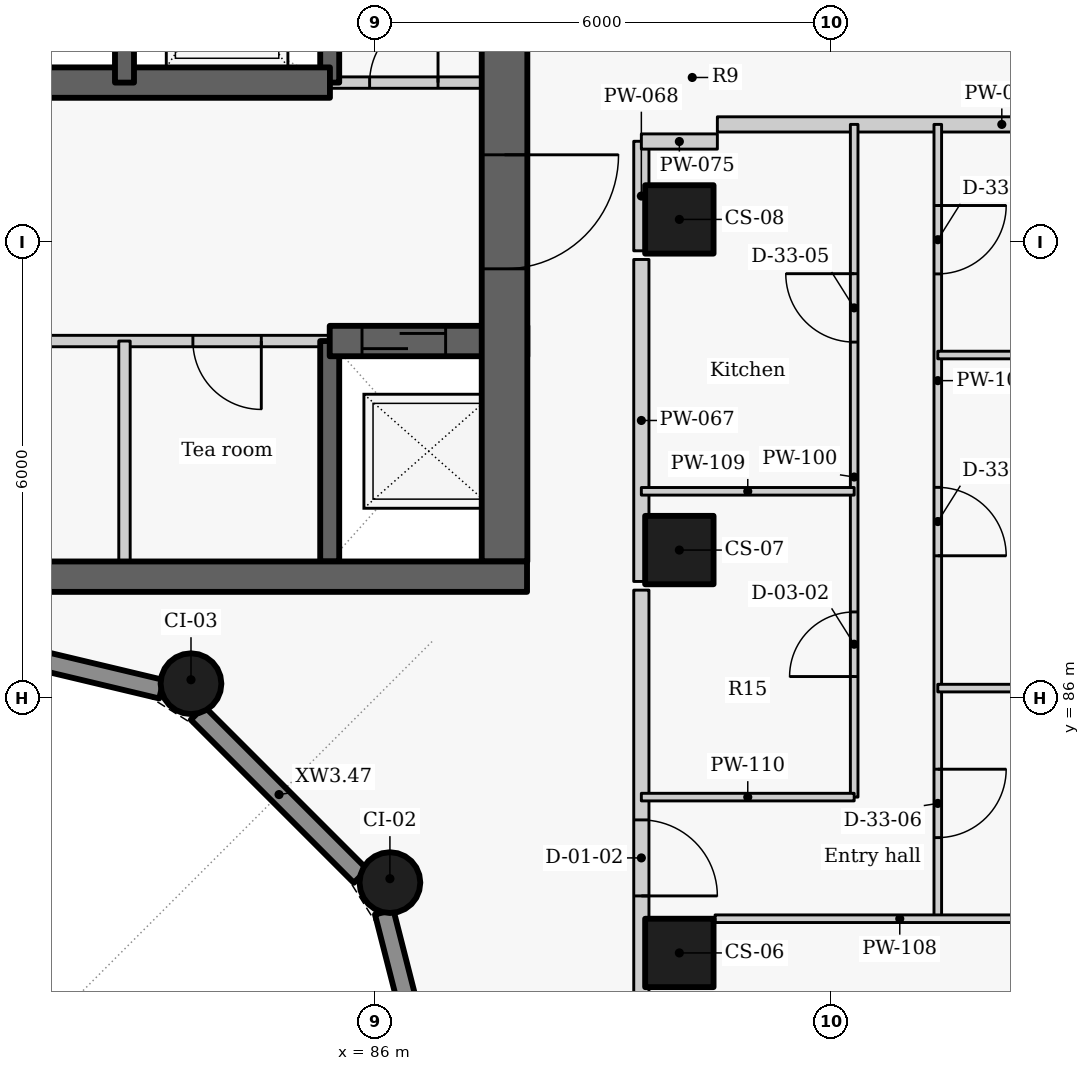
"""IFC4 building model, lengths in metres.
Left out: names, types, materials, properties, quantities, classifications, styles, units other than length and angle.
Written with IfcOpenShell. Run it as: python <this file> out.ifc"""

import sys

from ifc_helpers import new_model, si_unit, direction, frame, frame_2d, origin, origin_2d, place, context, subcontext, project, spatial, rectangle, circle, extrude, element, fill, save


model = new_model("IFC4")
c1 = context("Model", 3, precision=1e-05, world=origin(), true_north=direction((0.0, 1.0)))
c2 = subcontext(c1, "Body", "Model", "MODEL_VIEW")
j1 = project(units=[si_unit("LENGTHUNIT", "METRE"), si_unit("PLANEANGLEUNIT", "RADIAN")], contexts=[c1])
p1 = place(None, origin())
s1 = spatial("IfcSite", under=j1, at=p1, CompositionType="ELEMENT")
p2 = place(p1, origin())
s2 = spatial("IfcBuilding", under=s1, at=p2, CompositionType="ELEMENT")
p3 = place(p2, frame((0.0, 0.0, 226.2)))
s3 = spatial("IfcBuildingStorey", under=s2, at=p3, CompositionType="ELEMENT", Elevation=226.2)
for number, where, z_axis, x_axis in (
    (1, (90.0, 82.65, 0.0), (0.0, 0.0, 1.0), (0.0, 1.0, 0.0)),
    (2, (90.0, 87.95, 0.0), (0.0, 0.0, 1.0), (0.0, 1.0, 0.0)),
    (3, (90.0, 92.3, 0.0), (0.0, 0.0, 1.0), (0.0, 1.0, 0.0)),
):
    element("IfcColumn", number, at=place(p3, frame(where, z_axis=z_axis, x_axis=x_axis)), inside=s3, PredefinedType="COLUMN", context=c2, shape_type="SweptSolid", body=[
        extrude(rectangle(XDim=0.9, YDim=0.9, at=origin_2d()), origin(), (0.0, 0.0, 1.0), 3.3),
    ])
for number, where, z_axis, x_axis in (
    (4, (86.192, 83.575, 0.0), (0.0, 0.0, 1.0), (-0.5, 0.866, 0.0)),
    (5, (83.575, 86.192, 0.0), (0.0, 0.0, 1.0), (-0.866, 0.5, 0.0)),
):
    element("IfcColumn", number, at=place(p3, frame(where, z_axis=z_axis, x_axis=x_axis)), inside=s3, PredefinedType="COLUMN", context=c2, shape_type="SweptSolid", body=[
        extrude(circle(Radius=0.4, at=origin_2d()), origin(), (0.0, 0.0, 1.0), 3.3),
    ])
p4 = place(p3, frame((80.029, 86.872, 0.0), z_axis=(0.0, 0.0, 1.0), x_axis=(0.972773113459, -0.231759508395, 0.0)))
e6 = element("IfcWall", 6, at=p4, inside=s3, PredefinedType="SOLIDWALL", context=c2, shape_type="SweptSolid", body=[
    extrude(rectangle(XDim=3.246, YDim=0.25, at=frame_2d((1.623, 0.0))), origin(), (0.0, 0.0, 1.0), 2.425),
])
p5 = place(p3, frame((83.661, 85.806, 0.0), z_axis=(0.0, 0.0, 1.0), x_axis=(0.707106781187, -0.707106781187, 0.0)))
e7 = element("IfcWall", 7, at=p5, inside=s3, PredefinedType="SOLIDWALL", context=c2, shape_type="SweptSolid", body=[
    extrude(rectangle(XDim=3.033, YDim=0.25, at=frame_2d((1.517, 0.0))), origin(), (0.0, 0.0, 1.0), 2.425),
])
p6 = place(p3, frame((86.117, 83.187, 0.0), z_axis=(0.0, 0.0, 1.0), x_axis=(0.247055971283, -0.969001211069, 0.0)))
e8 = element("IfcWall", 8, at=p6, inside=s3, PredefinedType="SOLIDWALL", context=c2, shape_type="SweptSolid", body=[
    extrude(rectangle(XDim=3.01, YDim=0.25, at=frame_2d((1.505, 0.0))), origin(), (0.0, 0.0, 1.0), 2.425),
])
p7 = place(p3, frame((85.4, 90.7, 0.0), z_axis=(0.0, 0.0, 1.0), x_axis=(-1.0, 0.0, 0.0)))
e9 = element("IfcWall", 9, at=p7, inside=s3, PredefinedType="PARTITIONING", context=c2, shape_type="SweptSolid", body=[
    extrude(rectangle(XDim=13.4, YDim=0.15, at=frame_2d((6.7, 0.0))), origin(), (0.0, 0.0, 1.0), 3.025),
])
p8 = place(p7, frame((11.325, 0.0, 0.0)))
e10 = element("IfcOpeningElement", 10, at=p8, cuts=e9, PredefinedType="OPENING", context=c2, shape_type="SweptSolid", body=[
    extrude(rectangle(XDim=0.9, YDim=2.1, at=frame_2d((0.45, 1.05))), frame((0.0, 0.085, 0.0), z_axis=(0.0, -1.0, 0.0), x_axis=(1.0, 0.0, 0.0)), (0.0, 0.0, 1.0), 0.17),
])
p9 = place(p7, frame((9.0, 0.0, 0.0)))
e11 = element("IfcOpeningElement", 11, at=p9, cuts=e9, PredefinedType="OPENING", context=c2, shape_type="SweptSolid", body=[
    extrude(rectangle(XDim=0.9, YDim=2.1, at=frame_2d((0.45, 1.05))), frame((0.0, 0.085, 0.0), z_axis=(0.0, -1.0, 0.0), x_axis=(1.0, 0.0, 0.0)), (0.0, 0.0, 1.0), 0.17),
])
p10 = place(p7, frame((4.95, 0.0, 0.0)))
e12 = element("IfcOpeningElement", 12, at=p10, cuts=e9, PredefinedType="OPENING", context=c2, shape_type="SweptSolid", body=[
    extrude(rectangle(XDim=0.9, YDim=2.1, at=frame_2d((0.45, 1.05))), frame((0.0, 0.085, 0.0), z_axis=(0.0, -1.0, 0.0), x_axis=(1.0, 0.0, 0.0)), (0.0, 0.0, 1.0), 0.17),
])
p11 = place(p7, frame((0.9, 0.0, 0.0)))
e13 = element("IfcOpeningElement", 13, at=p11, cuts=e9, PredefinedType="OPENING", context=c2, shape_type="SweptSolid", body=[
    extrude(rectangle(XDim=0.9, YDim=2.1, at=frame_2d((0.45, 1.05))), frame((0.0, 0.085, 0.0), z_axis=(0.0, -1.0, 0.0), x_axis=(1.0, 0.0, 0.0)), (0.0, 0.0, 1.0), 0.17),
])
p12 = place(p3, frame((85.4, 87.8, -0.41), z_axis=(0.0, 0.0, 1.0), x_axis=(0.0, 1.0, 0.0)))
e14 = element("IfcWall", 14, at=p12, inside=s3, PredefinedType="SHEAR", context=c2, shape_type="SweptSolid", body=[
    extrude(rectangle(XDim=2.9, YDim=0.25, at=frame_2d((1.45, 0.0))), origin(), (0.0, 0.0, 1.0), 3.435),
])
p13 = place(p3, frame((85.4, 94.1, -0.41), z_axis=(0.0, 0.0, 1.0), x_axis=(0.0, 1.0, 0.0)))
e15 = element("IfcWall", 15, at=p13, inside=s3, PredefinedType="SHEAR", context=c2, shape_type="SweptSolid", body=[
    extrude(rectangle(XDim=2.8, YDim=0.25, at=frame_2d((1.4, 0.0))), origin(), (0.0, 0.0, 1.0), 3.435),
])
p14 = place(p3, frame((85.4, 90.7, -0.41), z_axis=(0.0, 0.0, 1.0), x_axis=(1.0, 0.0, 0.0)))
e16 = element("IfcWall", 16, at=p14, inside=s3, PredefinedType="SHEAR", context=c2, shape_type="SweptSolid", body=[
    extrude(rectangle(XDim=2.6, YDim=0.4, at=frame_2d((1.3, 0.0))), origin(), (0.0, 0.0, 1.0), 3.435),
])
p15 = place(p14, frame((0.425, 0.0, 0.41)))
e17 = element("IfcOpeningElement", 17, at=p15, cuts=e16, PredefinedType="OPENING", context=c2, shape_type="SweptSolid", body=[
    extrude(rectangle(XDim=1.1, YDim=2.1, at=frame_2d((0.55, 1.05))), frame((0.0, 0.21, 0.0), z_axis=(0.0, -1.0, 0.0), x_axis=(1.0, 0.0, 0.0)), (0.0, 0.0, 1.0), 0.42),
])
p16 = place(p3, frame((87.7, 102.05, -0.41), z_axis=(0.0, 0.0, 1.0), x_axis=(0.0, -1.0, 0.0)))
e18 = element("IfcWall", 18, at=p16, inside=s3, PredefinedType="SHEAR", context=c2, shape_type="SweptSolid", body=[
    extrude(rectangle(XDim=14.25, YDim=0.6, at=frame_2d((7.125, 0.0))), origin(), (0.0, 0.0, 1.0), 3.435),
])
p17 = place(p16, frame((8.9, 0.0, 0.41)))
e19 = element("IfcOpeningElement", 19, at=p17, cuts=e18, PredefinedType="OPENING", context=c2, shape_type="SweptSolid", body=[
    extrude(rectangle(XDim=1.5, YDim=2.1, at=frame_2d((0.75, 1.05))), frame((0.0, 0.31, 0.0), z_axis=(0.0, -1.0, 0.0), x_axis=(1.0, 0.0, 0.0)), (0.0, 0.0, 1.0), 0.62),
])
p18 = place(p16, frame((2.025, 0.0, 0.41)))
e20 = element("IfcOpeningElement", 20, at=p18, cuts=e18, PredefinedType="OPENING", context=c2, shape_type="SweptSolid", body=[
    extrude(rectangle(XDim=1.1, YDim=2.1, at=frame_2d((0.55, 1.05))), frame((0.0, 0.31, 0.0), z_axis=(0.0, -1.0, 0.0), x_axis=(1.0, 0.0, 0.0)), (0.0, 0.0, 1.0), 0.62),
])
p19 = place(p3, frame((82.7, 87.8, 0.0), z_axis=(0.0, 0.0, 1.0), x_axis=(0.0, 1.0, 0.0)))
e21 = element("IfcWall", 21, at=p19, inside=s3, PredefinedType="PARTITIONING", context=c2, shape_type="SweptSolid", body=[
    extrude(rectangle(XDim=2.9, YDim=0.15, at=frame_2d((1.45, 0.0))), origin(), (0.0, 0.0, 1.0), 3.025),
])
p20 = place(p3, frame((85.397, 94.1, 0.0), z_axis=(0.0, 0.0, 1.0), x_axis=(1.0, 0.0, 0.0)))
e22 = element("IfcWall", 22, at=p20, inside=s3, PredefinedType="PARTITIONING", context=c2, shape_type="SweptSolid", body=[
    extrude(rectangle(XDim=2.603, YDim=0.15, at=frame_2d((1.302, 0.0))), origin(), (0.0, 0.0, 1.0), 3.025),
])
p21 = place(p20, frame((0.528, 0.0, 0.0)))
e23 = element("IfcOpeningElement", 23, at=p21, cuts=e22, PredefinedType="OPENING", context=c2, shape_type="SweptSolid", body=[
    extrude(rectangle(XDim=0.9, YDim=2.1, at=frame_2d((0.45, 1.05))), frame((0.0, 0.085, 0.0), z_axis=(0.0, -1.0, 0.0), x_axis=(1.0, 0.0, 0.0)), (0.0, 0.0, 1.0), 0.17),
])
p22 = place(p3, frame((79.997, 94.1, -0.41), z_axis=(0.0, 0.0, 1.0), x_axis=(1.0, 0.0, 0.0)))
e24 = element("IfcWall", 24, at=p22, inside=s3, PredefinedType="SHEAR", context=c2, shape_type="SweptSolid", body=[
    extrude(rectangle(XDim=5.406, YDim=0.4, at=frame_2d((2.703, 0.0))), origin(), (0.0, 0.0, 1.0), 3.435),
])
p23 = place(p3, frame((82.7, 94.1, -0.41), z_axis=(0.0, 0.0, 1.0), x_axis=(0.0, 1.0, 0.0)))
e25 = element("IfcWall", 25, at=p23, inside=s3, PredefinedType="SHEAR", context=c2, shape_type="SweptSolid", body=[
    extrude(rectangle(XDim=2.8, YDim=0.25, at=frame_2d((1.4, 0.0))), origin(), (0.0, 0.0, 1.0), 3.435),
])
p24 = place(p3, frame((89.5, 87.423, 0.0), z_axis=(0.0, 0.0, 1.0), x_axis=(0.0, -1.0, 0.0)))
e26 = element("IfcWall", 26, at=p24, inside=s3, PredefinedType="PARTITIONING", context=c2, shape_type="SweptSolid", body=[
    extrude(rectangle(XDim=15.786, YDim=0.2, at=frame_2d((7.893, 0.0))), origin(), (0.0, 0.0, 1.0), 3.025),
])
p25 = place(p24, frame((6.923, 0.0, 0.0)))
e27 = element("IfcOpeningElement", 27, at=p25, cuts=e26, PredefinedType="OPENING", context=c2, shape_type="SweptSolid", body=[
    extrude(rectangle(XDim=1.0, YDim=2.1, at=frame_2d((0.5, 1.05))), frame((0.0, 0.11, 0.0), z_axis=(0.0, -1.0, 0.0), x_axis=(1.0, 0.0, 0.0)), (0.0, 0.0, 1.0), 0.22),
])
p26 = place(p24, frame((3.023, 0.0, 0.0)))
e28 = element("IfcOpeningElement", 28, at=p26, cuts=e26, PredefinedType="OPENING", context=c2, shape_type="SweptSolid", body=[
    extrude(rectangle(XDim=1.0, YDim=2.1, at=frame_2d((0.5, 1.05))), frame((0.0, 0.11, 0.0), z_axis=(0.0, -1.0, 0.0), x_axis=(1.0, 0.0, 0.0)), (0.0, 0.0, 1.0), 0.22),
])
p27 = place(p3, frame((89.5, 87.537, 0.0), z_axis=(0.0, 0.0, 1.0), x_axis=(0.0, 1.0, 0.0)))
e29 = element("IfcWall", 29, at=p27, inside=s3, PredefinedType="PARTITIONING", context=c2, shape_type="SweptSolid", body=[
    extrude(rectangle(XDim=4.236, YDim=0.2, at=frame_2d((2.118, 0.0))), origin(), (0.0, 0.0, 1.0), 3.025),
])
p28 = place(p3, frame((89.5, 91.887, 0.0), z_axis=(0.0, 0.0, 1.0), x_axis=(0.0, 1.0, 0.0)))
e30 = element("IfcWall", 30, at=p28, inside=s3, PredefinedType="PARTITIONING", context=c2, shape_type="SweptSolid", body=[
    extrude(rectangle(XDim=1.441, YDim=0.2, at=frame_2d((0.72, 0.0))), origin(), (0.0, 0.0, 1.0), 3.025),
])
p29 = place(p3, frame((90.5, 93.55, 0.0), z_axis=(0.0, 0.0, 1.0), x_axis=(1.0, 0.0, 0.0)))
e31 = element("IfcWall", 31, at=p29, inside=s3, PredefinedType="PARTITIONING", context=c2, shape_type="SweptSolid", body=[
    extrude(rectangle(XDim=7.485, YDim=0.2, at=frame_2d((3.742, 0.0))), origin(), (0.0, 0.0, 1.0), 2.405),
])
p30 = place(p3, frame((89.5, 93.325, 0.0), z_axis=(0.0, 0.0, 1.0), x_axis=(1.0, 0.0, 0.0)))
e32 = element("IfcWall", 32, at=p30, inside=s3, PredefinedType="PARTITIONING", context=c2, shape_type="SweptSolid", body=[
    extrude(rectangle(XDim=1.0, YDim=0.2, at=frame_2d((0.5, 0.0))), origin(), (0.0, 0.0, 1.0), 2.505),
])
p31 = place(p3, frame((92.3, 84.7, 0.0), z_axis=(0.0, 0.0, 1.0), x_axis=(0.0, 1.0, 0.0)))
e33 = element("IfcWall", 33, at=p31, inside=s3, PredefinedType="PARTITIONING", context=c2, shape_type="SweptSolid", body=[
    extrude(rectangle(XDim=8.85, YDim=0.1, at=frame_2d((4.425, 0.0))), origin(), (0.0, 0.0, 1.0), 3.025),
])
p32 = place(p31, frame((1.586, 0.0, 0.0)))
e34 = element("IfcOpeningElement", 34, at=p32, cuts=e33, PredefinedType="OPENING", context=c2, shape_type="SweptSolid", body=[
    extrude(rectangle(XDim=0.85, YDim=2.1, at=frame_2d((0.425, 1.05))), frame((0.0, 0.06, 0.0), z_axis=(0.0, -1.0, 0.0), x_axis=(1.0, 0.0, 0.0)), (0.0, 0.0, 1.0), 0.12),
])
p33 = place(p31, frame((5.986, 0.0, 0.0)))
e35 = element("IfcOpeningElement", 35, at=p33, cuts=e33, PredefinedType="OPENING", context=c2, shape_type="SweptSolid", body=[
    extrude(rectangle(XDim=0.9, YDim=2.1, at=frame_2d((0.45, 1.05))), frame((0.0, 0.06, 0.0), z_axis=(0.0, -1.0, 0.0), x_axis=(1.0, 0.0, 0.0)), (0.0, 0.0, 1.0), 0.12),
])
p34 = place(p3, frame((93.4, 93.55, 0.0), z_axis=(0.0, 0.0, 1.0), x_axis=(0.0, -1.0, 0.0)))
e36 = element("IfcWall", 36, at=p34, inside=s3, PredefinedType="PARTITIONING", context=c2, shape_type="SweptSolid", body=[
    extrude(rectangle(XDim=10.45, YDim=0.1, at=frame_2d((5.225, 0.0))), origin(), (0.0, 0.0, 1.0), 3.025),
])
p35 = place(p34, frame((8.483, 0.0, 0.0)))
e37 = element("IfcOpeningElement", 37, at=p35, cuts=e36, PredefinedType="OPENING", context=c2, shape_type="SweptSolid", body=[
    extrude(rectangle(XDim=0.9, YDim=2.1, at=frame_2d((0.45, 1.05))), frame((0.0, 0.06, 0.0), z_axis=(0.0, -1.0, 0.0), x_axis=(1.0, 0.0, 0.0)), (0.0, 0.0, 1.0), 0.12),
])
p36 = place(p34, frame((4.775, 0.0, 0.0)))
e38 = element("IfcOpeningElement", 38, at=p36, cuts=e36, PredefinedType="OPENING", context=c2, shape_type="SweptSolid", body=[
    extrude(rectangle(XDim=0.9, YDim=2.1, at=frame_2d((0.45, 1.05))), frame((0.0, 0.06, 0.0), z_axis=(0.0, -1.0, 0.0), x_axis=(1.0, 0.0, 0.0)), (0.0, 0.0, 1.0), 0.12),
])
p37 = place(p34, frame((1.067, 0.0, 0.0)))
e39 = element("IfcOpeningElement", 39, at=p37, cuts=e36, PredefinedType="OPENING", context=c2, shape_type="SweptSolid", body=[
    extrude(rectangle(XDim=0.9, YDim=2.1, at=frame_2d((0.45, 1.05))), frame((0.0, 0.06, 0.0), z_axis=(0.0, -1.0, 0.0), x_axis=(1.0, 0.0, 0.0)), (0.0, 0.0, 1.0), 0.12),
])
p38 = place(p3, frame((90.47, 83.1, 0.0), z_axis=(0.0, 0.0, 1.0), x_axis=(1.0, 0.0, 0.0)))
e40 = element("IfcWall", 40, at=p38, inside=s3, PredefinedType="PARTITIONING", context=c2, shape_type="SweptSolid", body=[
    extrude(rectangle(XDim=4.86, YDim=0.1, at=frame_2d((2.43, 0.0))), origin(), (0.0, 0.0, 1.0), 3.025),
])
for number, where, z_axis, x_axis in (
    (41, (89.5, 88.723, 0.0), (0.0, 0.0, 1.0), (1.0, 0.0, 0.0)),
    (42, (89.5, 84.7, 0.0), (0.0, 0.0, 1.0), (1.0, 0.0, 0.0)),
):
    element("IfcWall", number, at=place(p3, frame(where, z_axis=z_axis, x_axis=x_axis)), inside=s3, PredefinedType="PARTITIONING", context=c2, shape_type="SweptSolid", body=[
        extrude(rectangle(XDim=2.8, YDim=0.1, at=frame_2d((1.4, 0.0))), origin(), (0.0, 0.0, 1.0), 2.505),
    ])
p39 = place(p3, frame((93.4, 86.134, 0.0), z_axis=(0.0, 0.0, 1.0), x_axis=(1.0, 0.0, 0.0)))
e43 = element("IfcWall", 43, at=p39, inside=s3, PredefinedType="PARTITIONING", context=c2, shape_type="SweptSolid", body=[
    extrude(rectangle(XDim=8.866, YDim=0.1, at=frame_2d((4.433, 0.0))), origin(), (0.0, 0.0, 1.0), 2.405),
])
p40 = place(p3, frame((93.4, 90.516, 0.0), z_axis=(0.0, 0.0, 1.0), x_axis=(1.0, 0.0, 0.0)))
e44 = element("IfcWall", 44, at=p40, inside=s3, PredefinedType="PARTITIONING", context=c2, shape_type="SweptSolid", body=[
    extrude(rectangle(XDim=6.336, YDim=0.1, at=frame_2d((3.168, 0.0))), origin(), (0.0, 0.0, 1.0), 2.405),
])
p41 = place(p3, frame((72.004, 87.6, -0.41), z_axis=(0.0, 0.0, 1.0), x_axis=(1.0, 0.0, 0.0)))
e45 = element("IfcWall", 45, at=p41, inside=s3, PredefinedType="SHEAR", context=c2, shape_type="SweptSolid", body=[
    extrude(rectangle(XDim=15.992, YDim=0.4, at=frame_2d((7.996, 0.0))), origin(), (0.0, 0.0, 1.0), 3.435),
])
p42 = place(p15, origin())
e46 = element("IfcDoor", 46, at=p42, inside=s3, OperationType="SLIDING_TO_LEFT", PredefinedType="DOOR", context=c2, shape_type="SweptSolid", body=[
    extrude(rectangle(XDim=1.1, YDim=2.1, at=frame_2d((0.55, 1.05))), frame((0.0, 0.025, 0.0), z_axis=(0.0, -1.0, 0.0), x_axis=(1.0, 0.0, 0.0)), (0.0, 0.0, 1.0), 0.05),
])
fill(e17, e46)
p43 = place(p11, origin())
e47 = element("IfcDoor", 47, at=p43, inside=s3, OperationType="SINGLE_SWING_LEFT", PredefinedType="DOOR", context=c2, shape_type="SweptSolid", body=[
    extrude(rectangle(XDim=0.9, YDim=2.1, at=frame_2d((0.45, 1.05))), frame((0.0, 0.025, 0.0), z_axis=(0.0, -1.0, 0.0), x_axis=(1.0, 0.0, 0.0)), (0.0, 0.0, 1.0), 0.05),
])
fill(e13, e47)
p44 = place(p21, origin())
e48 = element("IfcDoor", 48, at=p44, inside=s3, OperationType="SINGLE_SWING_RIGHT", PredefinedType="DOOR", context=c2, shape_type="SweptSolid", body=[
    extrude(rectangle(XDim=0.9, YDim=2.1, at=frame_2d((0.45, 1.05))), frame((0.0, 0.025, 0.0), z_axis=(0.0, -1.0, 0.0), x_axis=(1.0, 0.0, 0.0)), (0.0, 0.0, 1.0), 0.05),
])
fill(e23, e48)
p45 = place(p26, origin())
e49 = element("IfcDoor", 49, at=p45, inside=s3, OperationType="SINGLE_SWING_RIGHT", PredefinedType="DOOR", context=c2, shape_type="SweptSolid", body=[
    extrude(rectangle(XDim=1.0, YDim=2.1, at=frame_2d((0.5, 1.05))), frame((0.0, 0.025, 0.0), z_axis=(0.0, -1.0, 0.0), x_axis=(1.0, 0.0, 0.0)), (0.0, 0.0, 1.0), 0.05),
])
fill(e28, e49)
p46 = place(p32, origin())
e50 = element("IfcDoor", 50, at=p46, inside=s3, OperationType="SINGLE_SWING_LEFT", PredefinedType="DOOR", context=c2, shape_type="SweptSolid", body=[
    extrude(rectangle(XDim=0.85, YDim=2.1, at=frame_2d((0.425, 1.05))), frame((0.0, 0.025, 0.0), z_axis=(0.0, -1.0, 0.0), x_axis=(1.0, 0.0, 0.0)), (0.0, 0.0, 1.0), 0.05),
])
fill(e34, e50)
p47 = place(p33, origin())
e51 = element("IfcDoor", 51, at=p47, inside=s3, OperationType="SINGLE_SWING_RIGHT", PredefinedType="DOOR", context=c2, shape_type="SweptSolid", body=[
    extrude(rectangle(XDim=0.9, YDim=2.1, at=frame_2d((0.45, 1.05))), frame((0.0, 0.025, 0.0), z_axis=(0.0, -1.0, 0.0), x_axis=(1.0, 0.0, 0.0)), (0.0, 0.0, 1.0), 0.05),
])
fill(e35, e51)
p48 = place(p35, origin())
e52 = element("IfcDoor", 52, at=p48, inside=s3, OperationType="SINGLE_SWING_LEFT", PredefinedType="DOOR", context=c2, shape_type="SweptSolid", body=[
    extrude(rectangle(XDim=0.9, YDim=2.1, at=frame_2d((0.45, 1.05))), frame((0.0, 0.025, 0.0), z_axis=(0.0, -1.0, 0.0), x_axis=(1.0, 0.0, 0.0)), (0.0, 0.0, 1.0), 0.05),
])
fill(e37, e52)
p49 = place(p36, origin())
e53 = element("IfcDoor", 53, at=p49, inside=s3, OperationType="SINGLE_SWING_RIGHT", PredefinedType="DOOR", context=c2, shape_type="SweptSolid", body=[
    extrude(rectangle(XDim=0.9, YDim=2.1, at=frame_2d((0.45, 1.05))), frame((0.0, 0.025, 0.0), z_axis=(0.0, -1.0, 0.0), x_axis=(1.0, 0.0, 0.0)), (0.0, 0.0, 1.0), 0.05),
])
fill(e38, e53)
p50 = place(p37, origin())
e54 = element("IfcDoor", 54, at=p50, inside=s3, OperationType="SINGLE_SWING_LEFT", PredefinedType="DOOR", context=c2, shape_type="SweptSolid", body=[
    extrude(rectangle(XDim=0.9, YDim=2.1, at=frame_2d((0.45, 1.05))), frame((0.0, 0.025, 0.0), z_axis=(0.0, -1.0, 0.0), x_axis=(1.0, 0.0, 0.0)), (0.0, 0.0, 1.0), 0.05),
])
fill(e39, e54)
p51 = place(p17, origin())
e55 = element("IfcDoor", 55, at=p51, inside=s3, OperationType="DOUBLE_DOOR_SINGLE_SWING", PredefinedType="DOOR", context=c2, shape_type="SweptSolid", body=[
    extrude(rectangle(XDim=1.5, YDim=2.1, at=frame_2d((0.75, 1.05))), frame((0.0, 0.025, 0.0), z_axis=(0.0, -1.0, 0.0), x_axis=(1.0, 0.0, 0.0)), (0.0, 0.0, 1.0), 0.05),
])
fill(e19, e55)
save(model, sys.argv[1])
